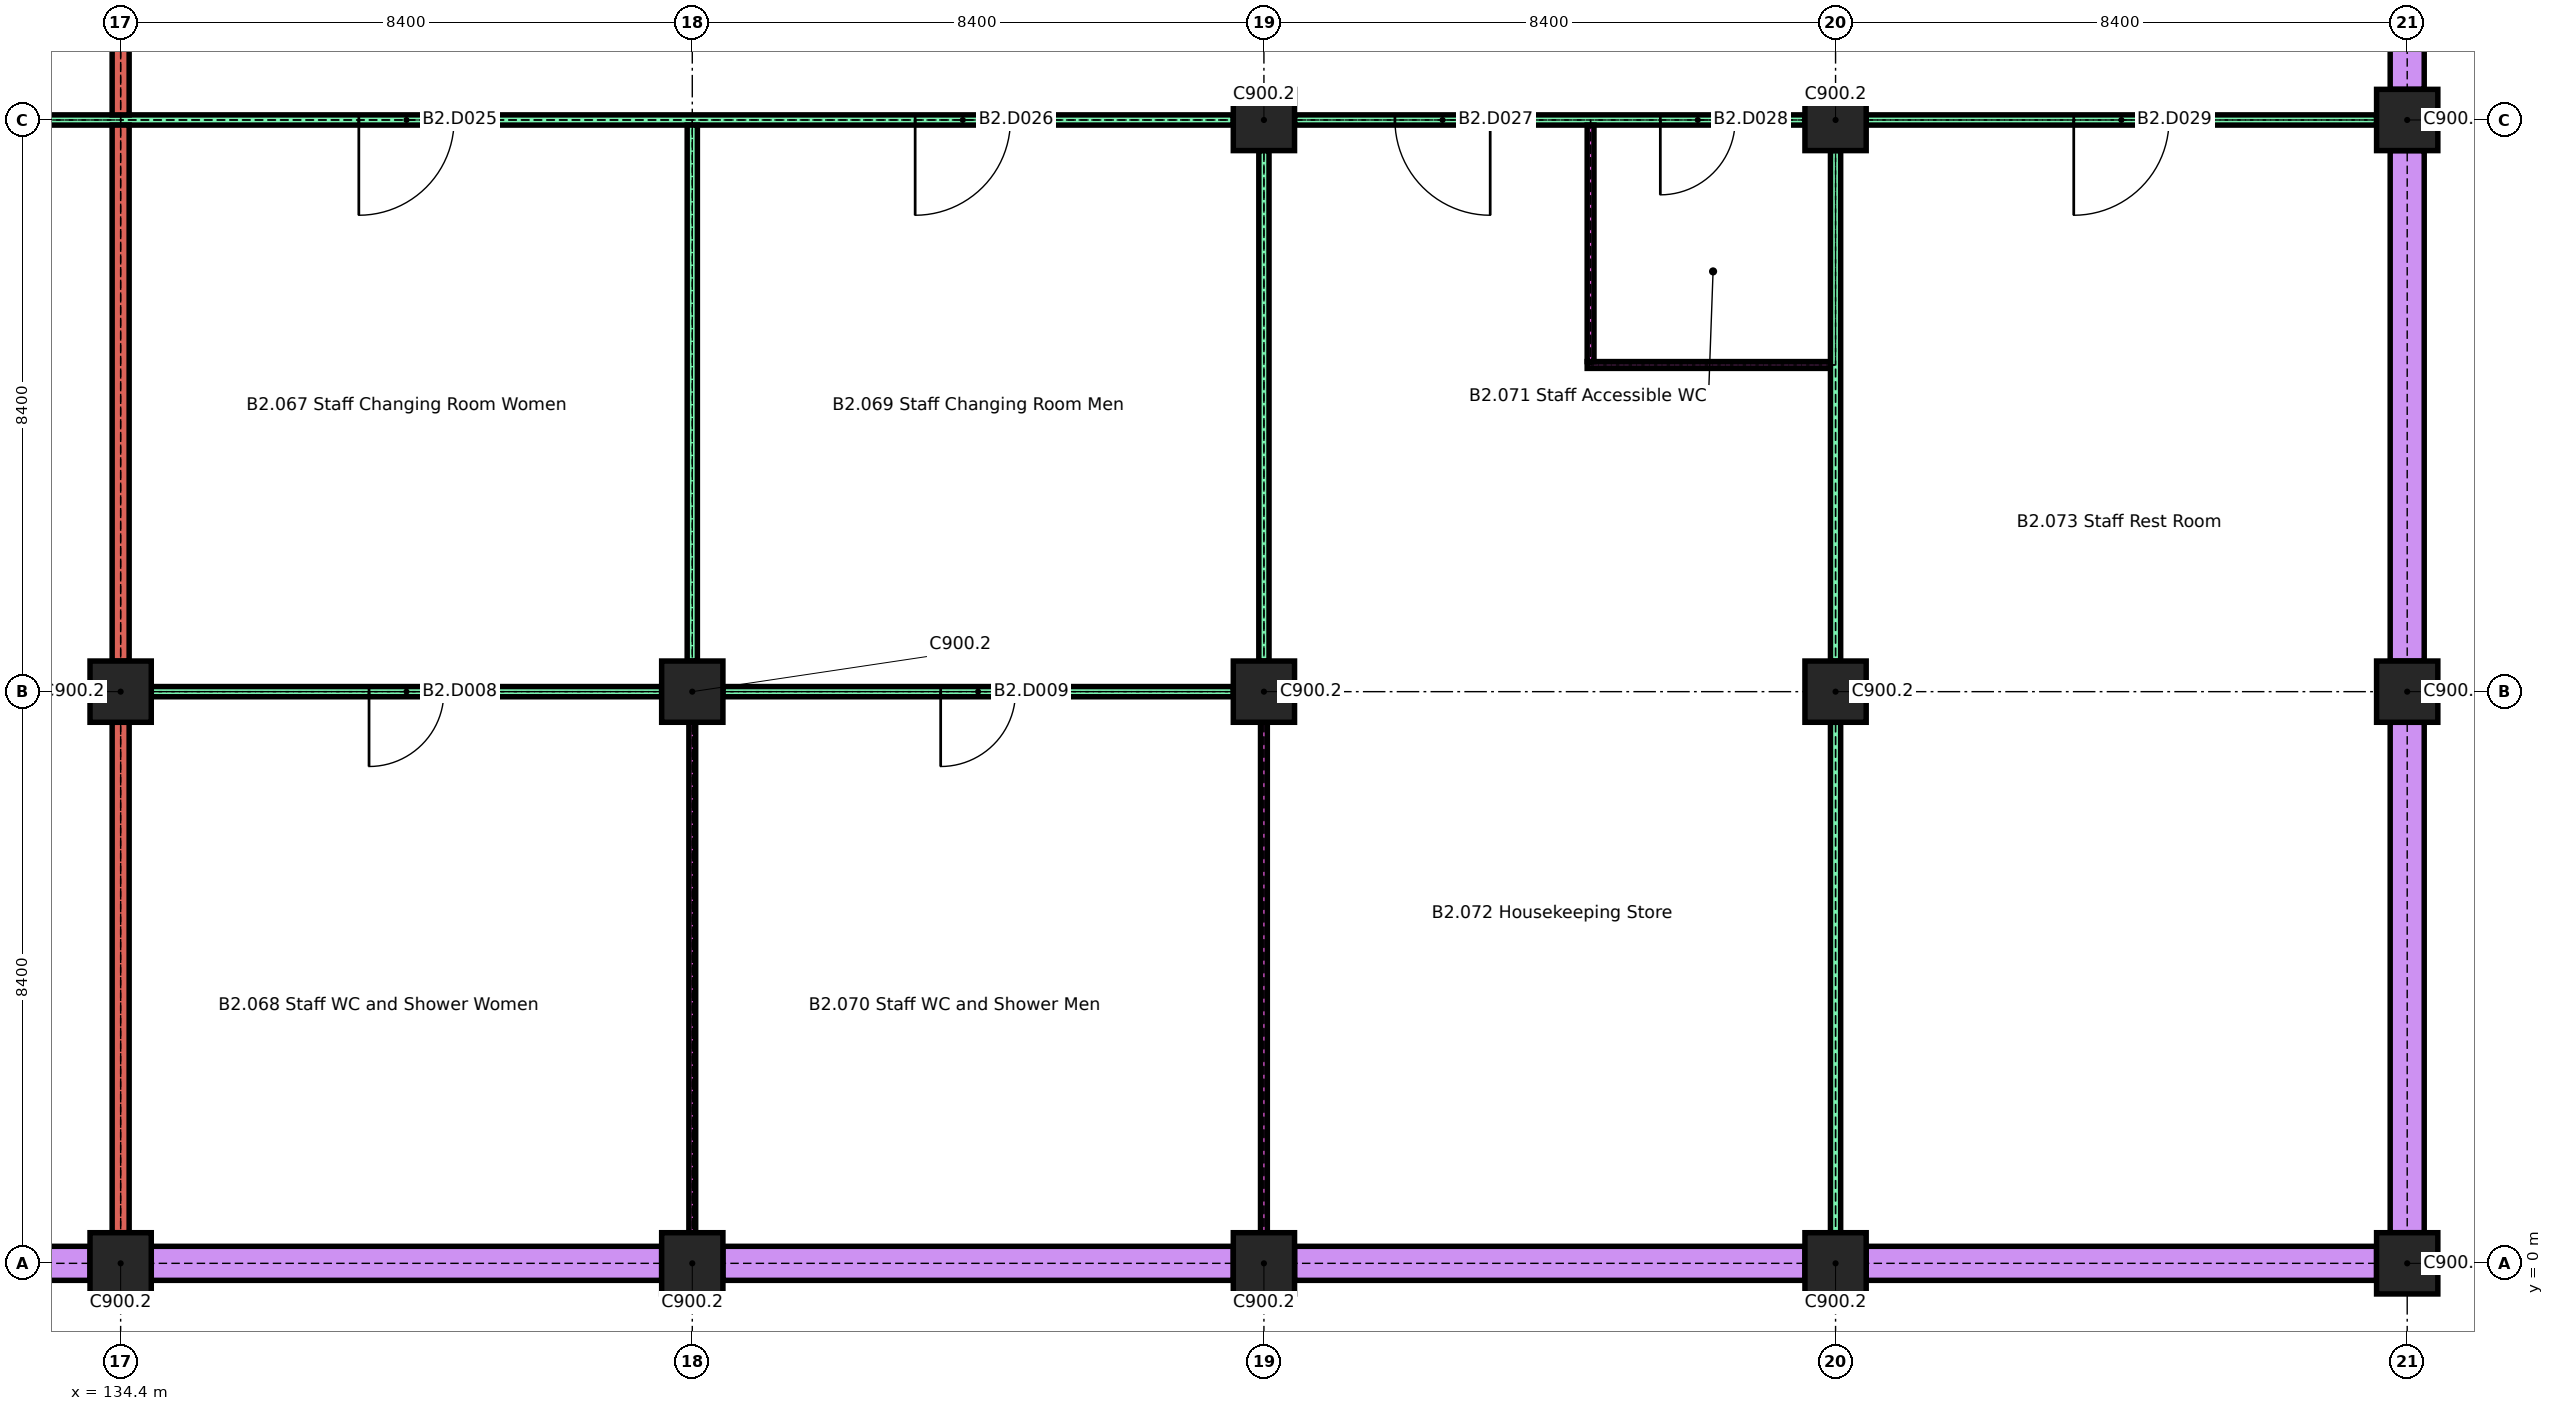
"""IFC4 building model, lengths in metres.
Left out: names, types, materials, properties, quantities, classifications, styles, units other than length and angle.
Written with IfcOpenShell. Run it as: python <this file> out.ifc"""

import sys

from ifc_helpers import new_model, si_unit, direction, frame, frame_2d, origin, origin_2d, place, context, subcontext, project, spatial, rectangle, extrude, element, fill, save


model = new_model("IFC4")
c1 = context("Model", 3, precision=1e-05, world=origin(), true_north=direction((0.0, 1.0)))
c2 = subcontext(c1, "Body", "Model", "MODEL_VIEW")
j1 = project(units=[si_unit("LENGTHUNIT", "METRE"), si_unit("PLANEANGLEUNIT", "RADIAN")], contexts=[c1])
p1 = place(None, origin())
s1 = spatial("IfcSite", under=j1, at=p1, CompositionType="ELEMENT")
p2 = place(p1, origin())
s2 = spatial("IfcBuilding", under=s1, at=p2, CompositionType="ELEMENT")
p3 = place(p2, frame((0.0, 0.0, -7.8)))
s3 = spatial("IfcBuildingStorey", under=s2, at=p3, CompositionType="ELEMENT", Elevation=-7.8)
for number, where, z_axis, x_axis in (
    (1, (134.4, 0.0, 0.0), (0.0, 0.0, 1.0), (1.0, 0.0, 0.0)),
    (2, (142.8, 0.0, 0.0), (0.0, 0.0, 1.0), (1.0, 0.0, 0.0)),
    (3, (151.2, 0.0, 0.0), (0.0, 0.0, 1.0), (1.0, 0.0, 0.0)),
    (4, (159.6, 0.0, 0.0), (0.0, 0.0, 1.0), (1.0, 0.0, 0.0)),
    (5, (168.0, 0.0, 0.0), (0.0, 0.0, 1.0), (1.0, 0.0, 0.0)),
    (6, (134.4, 8.4, 0.0), (0.0, 0.0, 1.0), (1.0, 0.0, 0.0)),
    (7, (142.8, 8.4, 0.0), (0.0, 0.0, 1.0), (1.0, 0.0, 0.0)),
    (8, (151.2, 8.4, 0.0), (0.0, 0.0, 1.0), (1.0, 0.0, 0.0)),
    (9, (159.6, 8.4, 0.0), (0.0, 0.0, 1.0), (1.0, 0.0, 0.0)),
    (10, (168.0, 8.4, 0.0), (0.0, 0.0, 1.0), (1.0, 0.0, 0.0)),
    (11, (151.2, 16.8, 0.0), (0.0, 0.0, 1.0), (1.0, 0.0, 0.0)),
    (12, (159.6, 16.8, 0.0), (0.0, 0.0, 1.0), (1.0, 0.0, 0.0)),
    (13, (168.0, 16.8, 0.0), (0.0, 0.0, 1.0), (1.0, 0.0, 0.0)),
):
    element("IfcColumn", number, at=place(p3, frame(where, z_axis=z_axis, x_axis=x_axis)), inside=s3, PredefinedType="COLUMN", context=c2, shape_type="SweptSolid", body=[
        extrude(rectangle(XDim=0.9, YDim=0.9, at=origin_2d()), origin(), (0.0, 0.0, 1.0), 3.1),
    ])
for number, where, z_axis, x_axis in (
    (14, (126.45, 0.0, 0.0), (0.0, 0.0, 1.0), (1.0, 0.0, 0.0)),
    (15, (134.85, 0.0, 0.0), (0.0, 0.0, 1.0), (1.0, 0.0, 0.0)),
    (16, (143.25, 0.0, 0.0), (0.0, 0.0, 1.0), (1.0, 0.0, 0.0)),
    (17, (151.65, 0.0, 0.0), (0.0, 0.0, 1.0), (1.0, 0.0, 0.0)),
    (18, (160.05, 0.0, 0.0), (0.0, 0.0, 1.0), (1.0, 0.0, 0.0)),
    (19, (168.0, 0.45, 0.0), (0.0, 0.0, 1.0), (0.0, 1.0, 0.0)),
    (20, (168.0, 8.85, 0.0), (0.0, 0.0, 1.0), (0.0, 1.0, 0.0)),
):
    element("IfcWall", number, at=place(p3, frame(where, z_axis=z_axis, x_axis=x_axis)), inside=s3, PredefinedType="SOLIDWALL", context=c2, shape_type="SweptSolid", body=[
        extrude(rectangle(XDim=7.5, YDim=0.5, at=frame_2d((3.75, 0.0))), origin(), (0.0, 0.0, 1.0), 3.1),
    ])
p4 = place(p3, frame((168.0, 17.25, 0.0), z_axis=(0.0, 0.0, 1.0), x_axis=(0.0, 1.0, 0.0)))
e21 = element("IfcWall", 21, at=p4, inside=s3, PredefinedType="SOLIDWALL", context=c2, shape_type="SweptSolid", body=[
    extrude(rectangle(XDim=16.6, YDim=0.5, at=frame_2d((8.3, 0.0))), origin(), (0.0, 0.0, 1.0), 3.1),
])
p5 = place(p3, frame((134.85, 8.4, 0.0), z_axis=(0.0, 0.0, 1.0), x_axis=(1.0, 0.0, 0.0)))
e22 = element("IfcWall", 22, at=p5, inside=s3, PredefinedType="PARTITIONING", context=c2, shape_type="SweptSolid", body=[
    extrude(rectangle(XDim=7.5, YDim=0.15, at=frame_2d((3.75, 0.0))), origin(), (0.0, 0.0, 1.0), 3.1),
])
p6 = place(p5, frame((3.2, 0.0, 0.0)))
e23 = element("IfcOpeningElement", 23, at=p6, cuts=e22, PredefinedType="OPENING", context=c2, shape_type="SweptSolid", body=[
    extrude(rectangle(XDim=1.1, YDim=2.1, at=frame_2d((0.55, 1.05))), frame((0.0, 0.085, 0.0), z_axis=(0.0, -1.0, 0.0), x_axis=(1.0, 0.0, 0.0)), (0.0, 0.0, 1.0), 0.17),
])
p7 = place(p3, frame((143.25, 8.4, 0.0), z_axis=(0.0, 0.0, 1.0), x_axis=(1.0, 0.0, 0.0)))
e24 = element("IfcWall", 24, at=p7, inside=s3, PredefinedType="PARTITIONING", context=c2, shape_type="SweptSolid", body=[
    extrude(rectangle(XDim=7.5, YDim=0.15, at=frame_2d((3.75, 0.0))), origin(), (0.0, 0.0, 1.0), 3.1),
])
p8 = place(p7, frame((3.2, 0.0, 0.0)))
e25 = element("IfcOpeningElement", 25, at=p8, cuts=e24, PredefinedType="OPENING", context=c2, shape_type="SweptSolid", body=[
    extrude(rectangle(XDim=1.1, YDim=2.1, at=frame_2d((0.55, 1.05))), frame((0.0, 0.085, 0.0), z_axis=(0.0, -1.0, 0.0), x_axis=(1.0, 0.0, 0.0)), (0.0, 0.0, 1.0), 0.17),
])
p9 = place(p3, frame((155.95, 13.2, 0.0), z_axis=(0.0, 0.0, 1.0), x_axis=(1.0, 0.0, 0.0)))
e26 = element("IfcWall", 26, at=p9, inside=s3, PredefinedType="PARTITIONING", context=c2, shape_type="SweptSolid", body=[
    extrude(rectangle(XDim=3.575, YDim=0.1, at=frame_2d((1.788, 0.0))), origin(), (0.0, 0.0, 1.0), 3.1),
])
p10 = place(p3, frame((126.0, 16.8, 0.0), z_axis=(0.0, 0.0, 1.0), x_axis=(1.0, 0.0, 0.0)))
e27 = element("IfcWall", 27, at=p10, inside=s3, PredefinedType="PARTITIONING", context=c2, shape_type="SweptSolid", body=[
    extrude(rectangle(XDim=24.75, YDim=0.15, at=frame_2d((12.375, 0.0))), origin(), (0.0, 0.0, 1.0), 3.1),
])
p11 = place(p10, frame((3.5, 0.0, 0.0)))
e28 = element("IfcOpeningElement", 28, at=p11, cuts=e27, PredefinedType="OPENING", context=c2, shape_type="SweptSolid", body=[
    extrude(rectangle(XDim=1.4, YDim=2.1, at=frame_2d((0.7, 1.05))), frame((0.0, 0.085, 0.0), z_axis=(0.0, -1.0, 0.0), x_axis=(1.0, 0.0, 0.0)), (0.0, 0.0, 1.0), 0.17),
])
p12 = place(p10, frame((11.9, 0.0, 0.0)))
e29 = element("IfcOpeningElement", 29, at=p12, cuts=e27, PredefinedType="OPENING", context=c2, shape_type="SweptSolid", body=[
    extrude(rectangle(XDim=1.4, YDim=2.1, at=frame_2d((0.7, 1.05))), frame((0.0, 0.085, 0.0), z_axis=(0.0, -1.0, 0.0), x_axis=(1.0, 0.0, 0.0)), (0.0, 0.0, 1.0), 0.17),
])
p13 = place(p10, frame((20.075, 0.0, 0.0)))
e30 = element("IfcOpeningElement", 30, at=p13, cuts=e27, PredefinedType="OPENING", context=c2, shape_type="SweptSolid", body=[
    extrude(rectangle(XDim=1.4, YDim=2.1, at=frame_2d((0.7, 1.05))), frame((0.0, 0.085, 0.0), z_axis=(0.0, -1.0, 0.0), x_axis=(1.0, 0.0, 0.0)), (0.0, 0.0, 1.0), 0.17),
])
p14 = place(p3, frame((151.65, 16.8, 0.0), z_axis=(0.0, 0.0, 1.0), x_axis=(1.0, 0.0, 0.0)))
e31 = element("IfcWall", 31, at=p14, inside=s3, PredefinedType="PARTITIONING", context=c2, shape_type="SweptSolid", body=[
    extrude(rectangle(XDim=7.5, YDim=0.15, at=frame_2d((3.75, 0.0))), origin(), (0.0, 0.0, 1.0), 3.1),
])
p15 = place(p14, frame((1.475, 0.0, 0.0)))
e32 = element("IfcOpeningElement", 32, at=p15, cuts=e31, PredefinedType="OPENING", context=c2, shape_type="SweptSolid", body=[
    extrude(rectangle(XDim=1.4, YDim=2.1, at=frame_2d((0.7, 1.05))), frame((0.0, 0.085, 0.0), z_axis=(0.0, -1.0, 0.0), x_axis=(1.0, 0.0, 0.0)), (0.0, 0.0, 1.0), 0.17),
])
p16 = place(p14, frame((5.375, 0.0, 0.0)))
e33 = element("IfcOpeningElement", 33, at=p16, cuts=e31, PredefinedType="OPENING", context=c2, shape_type="SweptSolid", body=[
    extrude(rectangle(XDim=1.1, YDim=2.1, at=frame_2d((0.55, 1.05))), frame((0.0, 0.085, 0.0), z_axis=(0.0, -1.0, 0.0), x_axis=(1.0, 0.0, 0.0)), (0.0, 0.0, 1.0), 0.17),
])
p17 = place(p3, frame((160.05, 16.8, 0.0), z_axis=(0.0, 0.0, 1.0), x_axis=(1.0, 0.0, 0.0)))
e34 = element("IfcWall", 34, at=p17, inside=s3, PredefinedType="PARTITIONING", context=c2, shape_type="SweptSolid", body=[
    extrude(rectangle(XDim=7.5, YDim=0.15, at=frame_2d((3.75, 0.0))), origin(), (0.0, 0.0, 1.0), 3.1),
])
p18 = place(p17, frame((3.05, 0.0, 0.0)))
e35 = element("IfcOpeningElement", 35, at=p18, cuts=e34, PredefinedType="OPENING", context=c2, shape_type="SweptSolid", body=[
    extrude(rectangle(XDim=1.4, YDim=2.1, at=frame_2d((0.7, 1.05))), frame((0.0, 0.085, 0.0), z_axis=(0.0, -1.0, 0.0), x_axis=(1.0, 0.0, 0.0)), (0.0, 0.0, 1.0), 0.17),
])
p19 = place(p3, frame((134.4, 0.45, 0.0), z_axis=(0.0, 0.0, 1.0), x_axis=(0.0, 1.0, 0.0)))
e36 = element("IfcWall", 36, at=p19, inside=s3, PredefinedType="SOLIDWALL", context=c2, shape_type="SweptSolid", body=[
    extrude(rectangle(XDim=7.5, YDim=0.25, at=frame_2d((3.75, 0.0))), origin(), (0.0, 0.0, 1.0), 3.1),
])
p20 = place(p3, frame((134.4, 8.85, 0.0), z_axis=(0.0, 0.0, 1.0), x_axis=(0.0, 1.0, 0.0)))
e37 = element("IfcWall", 37, at=p20, inside=s3, PredefinedType="SOLIDWALL", context=c2, shape_type="SweptSolid", body=[
    extrude(rectangle(XDim=7.875, YDim=0.25, at=frame_2d((3.938, 0.0))), origin(), (0.0, 0.0, 1.0), 3.1),
])
p21 = place(p3, frame((134.4, 16.875, 0.0), z_axis=(0.0, 0.0, 1.0), x_axis=(0.0, 1.0, 0.0)))
e38 = element("IfcWall", 38, at=p21, inside=s3, PredefinedType="SOLIDWALL", context=c2, shape_type="SweptSolid", body=[
    extrude(rectangle(XDim=4.525, YDim=0.25, at=frame_2d((2.262, 0.0))), origin(), (0.0, 0.0, 1.0), 3.1),
])
p22 = place(p21, frame((1.262, 0.0, 0.0)))
e39 = element("IfcOpeningElement", 39, at=p22, cuts=e38, PredefinedType="OPENING", context=c2, shape_type="SweptSolid", body=[
    extrude(rectangle(XDim=2.0, YDim=2.4, at=frame_2d((1.0, 1.2))), frame((0.0, 0.135, 0.0), z_axis=(0.0, -1.0, 0.0), x_axis=(1.0, 0.0, 0.0)), (0.0, 0.0, 1.0), 0.27),
])
p23 = place(p3, frame((142.8, 0.45, 0.0), z_axis=(0.0, 0.0, 1.0), x_axis=(0.0, 1.0, 0.0)))
e40 = element("IfcWall", 40, at=p23, inside=s3, PredefinedType="PARTITIONING", context=c2, shape_type="SweptSolid", body=[
    extrude(rectangle(XDim=7.5, YDim=0.1, at=frame_2d((3.75, 0.0))), origin(), (0.0, 0.0, 1.0), 3.1),
])
p24 = place(p3, frame((142.8, 8.85, 0.0), z_axis=(0.0, 0.0, 1.0), x_axis=(0.0, 1.0, 0.0)))
e41 = element("IfcWall", 41, at=p24, inside=s3, PredefinedType="PARTITIONING", context=c2, shape_type="SweptSolid", body=[
    extrude(rectangle(XDim=7.875, YDim=0.15, at=frame_2d((3.938, 0.0))), origin(), (0.0, 0.0, 1.0), 3.1),
])
p25 = place(p3, frame((151.2, 0.45, 0.0), z_axis=(0.0, 0.0, 1.0), x_axis=(0.0, 1.0, 0.0)))
e42 = element("IfcWall", 42, at=p25, inside=s3, PredefinedType="PARTITIONING", context=c2, shape_type="SweptSolid", body=[
    extrude(rectangle(XDim=7.5, YDim=0.1, at=frame_2d((3.75, 0.0))), origin(), (0.0, 0.0, 1.0), 3.1),
])
p26 = place(p3, frame((151.2, 8.85, 0.0), z_axis=(0.0, 0.0, 1.0), x_axis=(0.0, 1.0, 0.0)))
e43 = element("IfcWall", 43, at=p26, inside=s3, PredefinedType="PARTITIONING", context=c2, shape_type="SweptSolid", body=[
    extrude(rectangle(XDim=7.5, YDim=0.15, at=frame_2d((3.75, 0.0))), origin(), (0.0, 0.0, 1.0), 3.1),
])
p27 = place(p3, frame((156.0, 13.25, 0.0), z_axis=(0.0, 0.0, 1.0), x_axis=(0.0, 1.0, 0.0)))
e44 = element("IfcWall", 44, at=p27, inside=s3, PredefinedType="PARTITIONING", context=c2, shape_type="SweptSolid", body=[
    extrude(rectangle(XDim=3.475, YDim=0.1, at=frame_2d((1.738, 0.0))), origin(), (0.0, 0.0, 1.0), 3.1),
])
for number, where, z_axis, x_axis in (
    (45, (159.6, 0.45, 0.0), (0.0, 0.0, 1.0), (0.0, 1.0, 0.0)),
    (46, (159.6, 8.85, 0.0), (0.0, 0.0, 1.0), (0.0, 1.0, 0.0)),
):
    element("IfcWall", number, at=place(p3, frame(where, z_axis=z_axis, x_axis=x_axis)), inside=s3, PredefinedType="PARTITIONING", context=c2, shape_type="SweptSolid", body=[
        extrude(rectangle(XDim=7.5, YDim=0.15, at=frame_2d((3.75, 0.0))), origin(), (0.0, 0.0, 1.0), 3.1),
    ])
p28 = place(p6, origin())
e47 = element("IfcDoor", 47, at=p28, inside=s3, OperationType="SINGLE_SWING_LEFT", PredefinedType="DOOR", context=c2, shape_type="SweptSolid", body=[
    extrude(rectangle(XDim=1.1, YDim=2.1, at=frame_2d((0.55, 1.05))), frame((0.0, 0.025, 0.0), z_axis=(0.0, -1.0, 0.0), x_axis=(1.0, 0.0, 0.0)), (0.0, 0.0, 1.0), 0.05),
])
fill(e23, e47)
p29 = place(p8, origin())
e48 = element("IfcDoor", 48, at=p29, inside=s3, OperationType="SINGLE_SWING_LEFT", PredefinedType="DOOR", context=c2, shape_type="SweptSolid", body=[
    extrude(rectangle(XDim=1.1, YDim=2.1, at=frame_2d((0.55, 1.05))), frame((0.0, 0.025, 0.0), z_axis=(0.0, -1.0, 0.0), x_axis=(1.0, 0.0, 0.0)), (0.0, 0.0, 1.0), 0.05),
])
fill(e25, e48)
p30 = place(p12, origin())
e49 = element("IfcDoor", 49, at=p30, inside=s3, OperationType="SINGLE_SWING_LEFT", PredefinedType="DOOR", context=c2, shape_type="SweptSolid", body=[
    extrude(rectangle(XDim=1.4, YDim=2.1, at=frame_2d((0.7, 1.05))), frame((0.0, 0.025, 0.0), z_axis=(0.0, -1.0, 0.0), x_axis=(1.0, 0.0, 0.0)), (0.0, 0.0, 1.0), 0.05),
])
fill(e29, e49)
p31 = place(p13, origin())
e50 = element("IfcDoor", 50, at=p31, inside=s3, OperationType="SINGLE_SWING_LEFT", PredefinedType="DOOR", context=c2, shape_type="SweptSolid", body=[
    extrude(rectangle(XDim=1.4, YDim=2.1, at=frame_2d((0.7, 1.05))), frame((0.0, 0.025, 0.0), z_axis=(0.0, -1.0, 0.0), x_axis=(1.0, 0.0, 0.0)), (0.0, 0.0, 1.0), 0.05),
])
fill(e30, e50)
p32 = place(p15, origin())
e51 = element("IfcDoor", 51, at=p32, inside=s3, OperationType="SINGLE_SWING_RIGHT", PredefinedType="DOOR", context=c2, shape_type="SweptSolid", body=[
    extrude(rectangle(XDim=1.4, YDim=2.1, at=frame_2d((0.7, 1.05))), frame((0.0, 0.025, 0.0), z_axis=(0.0, -1.0, 0.0), x_axis=(1.0, 0.0, 0.0)), (0.0, 0.0, 1.0), 0.05),
])
fill(e32, e51)
p33 = place(p16, origin())
e52 = element("IfcDoor", 52, at=p33, inside=s3, OperationType="SINGLE_SWING_LEFT", PredefinedType="DOOR", context=c2, shape_type="SweptSolid", body=[
    extrude(rectangle(XDim=1.1, YDim=2.1, at=frame_2d((0.55, 1.05))), frame((0.0, 0.025, 0.0), z_axis=(0.0, -1.0, 0.0), x_axis=(1.0, 0.0, 0.0)), (0.0, 0.0, 1.0), 0.05),
])
fill(e33, e52)
p34 = place(p18, origin())
e53 = element("IfcDoor", 53, at=p34, inside=s3, OperationType="SINGLE_SWING_LEFT", PredefinedType="DOOR", context=c2, shape_type="SweptSolid", body=[
    extrude(rectangle(XDim=1.4, YDim=2.1, at=frame_2d((0.7, 1.05))), frame((0.0, 0.025, 0.0), z_axis=(0.0, -1.0, 0.0), x_axis=(1.0, 0.0, 0.0)), (0.0, 0.0, 1.0), 0.05),
])
fill(e35, e53)
save(model, sys.argv[1])
